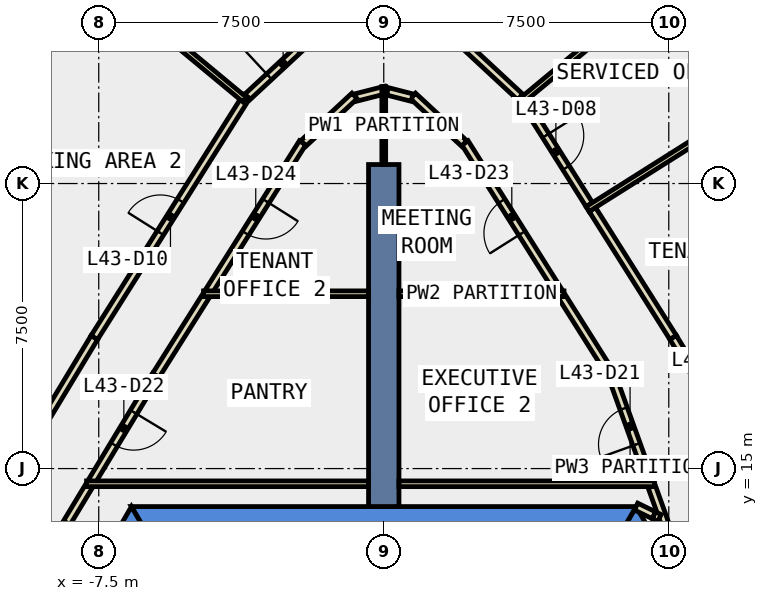
"""IFC4 building model, lengths in metres.
Left out: names, types, materials, properties, quantities, classifications, styles, units other than length and angle.
Written with IfcOpenShell. Run it as: python <this file> out.ifc"""

import sys

from ifc_helpers import new_model, si_unit, direction, frame, frame_2d, origin, place, context, subcontext, project, spatial, polyline, rectangle, outline, extrude, element, fill, save


model = new_model("IFC4")
c1 = context("Model", 3, precision=1e-05, world=origin(), true_north=direction((0.0, 1.0)))
c2 = subcontext(c1, "Body", "Model", "MODEL_VIEW")
j1 = project(units=[si_unit("LENGTHUNIT", "METRE"), si_unit("PLANEANGLEUNIT", "RADIAN")], contexts=[c1])
p1 = place(None, origin())
s1 = spatial("IfcSite", under=j1, at=p1, CompositionType="ELEMENT")
p2 = place(p1, origin())
s2 = spatial("IfcBuilding", under=s1, at=p2, CompositionType="ELEMENT")
p3 = place(p2, frame((0.0, 0.0, 194.0)))
s3 = spatial("IfcBuildingStorey", under=s2, at=p3, CompositionType="ELEMENT", Elevation=194.0)
p4 = place(p3, frame((0.0, 0.0, -0.4)))
e1 = element("IfcWall", 1, at=p4, inside=s3, PredefinedType="SHEAR", context=c2, shape_type="SweptSolid", body=[
    extrude(outline(polyline([(6.478, 12.88), (7.084, 13.23), (6.64, 14.0), (6.235, 13.3), (6.478, 12.88)])), origin(), (0.0, 0.0, 1.0), 4.2),
])
p5 = place(p3, frame((0.0, 0.0, -0.4)))
e2 = element("IfcWall", 2, at=p5, inside=s3, PredefinedType="SHEAR", context=c2, shape_type="SweptSolid", body=[
    extrude(outline(polyline([(6.64, 14.0), (-6.64, 14.0), (-6.235, 13.3), (6.235, 13.3), (6.64, 14.0)])), origin(), (0.0, 0.0, 1.0), 4.2),
])
p6 = place(p3, frame((0.0, 0.0, -0.4)))
e3 = element("IfcWall", 3, at=p6, inside=s3, PredefinedType="SHEAR", context=c2, shape_type="SweptSolid", body=[
    extrude(outline(polyline([(-11.834, 5.002), (-11.228, 4.652), (-6.235, 13.3), (-6.64, 14.0), (-11.834, 5.002)])), origin(), (0.0, 0.0, 1.0), 4.2),
])
p7 = place(p3, frame((0.0, 14.0, -0.4), z_axis=(0.0, 0.0, 1.0), x_axis=(0.0, 1.0, 0.0)))
e4 = element("IfcWall", 4, at=p7, inside=s3, PredefinedType="SHEAR", context=c2, shape_type="SweptSolid", body=[
    extrude(rectangle(XDim=9.0, YDim=0.8, at=frame_2d((4.5, 0.0))), origin(), (0.0, 0.0, 1.0), 4.2),
])
p8 = place(p3, frame((-8.394, 27.988, 0.0), z_axis=(0.0, 0.0, 1.0), x_axis=(-0.533680752529, -0.845686025887, 0.0)))
e5 = element("IfcWall", 5, at=p8, inside=s3, PredefinedType="STANDARD", context=c2, shape_type="SweptSolid", body=[
    extrude(rectangle(XDim=7.208, YDim=0.3, at=frame_2d((3.604, 0.0))), origin(), (0.0, 0.0, 1.0), 3.8),
])
p9 = place(p8, frame((0.602, 0.0, 0.9)))
e6 = element("IfcOpeningElement", 6, at=p9, cuts=e5, PredefinedType="OPENING", context=c2, shape_type="SweptSolid", body=[
    extrude(rectangle(XDim=2.4, YDim=2.6, at=frame_2d((1.2, 1.3))), frame((0.0, 0.16, 0.0), z_axis=(0.0, -1.0, 0.0), x_axis=(1.0, 0.0, 0.0)), (0.0, 0.0, 1.0), 0.32),
])
p10 = place(p8, frame((4.206, 0.0, 0.9)))
e7 = element("IfcOpeningElement", 7, at=p10, cuts=e5, PredefinedType="OPENING", context=c2, shape_type="SweptSolid", body=[
    extrude(rectangle(XDim=2.4, YDim=2.6, at=frame_2d((1.2, 1.3))), frame((0.0, 0.16, 0.0), z_axis=(0.0, -1.0, 0.0), x_axis=(1.0, 0.0, 0.0)), (0.0, 0.0, 1.0), 0.32),
])
p11 = place(p3, frame((6.64, 14.0, 0.0), z_axis=(0.0, 0.0, 1.0), x_axis=(0.899046412443, -0.437853341055, 0.0)))
e8 = element("IfcWall", 8, at=p11, inside=s3, PredefinedType="PARTITIONING", context=c2, shape_type="SweptSolid", body=[
    extrude(rectangle(XDim=0.523, YDim=0.2, at=frame_2d((0.261, 0.0))), origin(), (0.0, 0.0, 1.0), 3.8),
])
p12 = place(p3, frame((7.401, 13.552, 0.0), z_axis=(0.0, 0.0, 1.0), x_axis=(-0.337944878606, 0.941165904091, 0.0)))
e9 = element("IfcWall", 9, at=p12, inside=s3, PredefinedType="PARTITIONING", context=c2, shape_type="SweptSolid", body=[
    extrude(rectangle(XDim=1.038, YDim=0.2, at=frame_2d((0.519, 0.0))), origin(), (0.0, 0.0, 1.0), 3.8),
])
p13 = place(p3, frame((-7.759, 14.536, 0.0), z_axis=(0.0, 0.0, 1.0), x_axis=(-0.516926279395, -0.856029918678, 0.0)))
e10 = element("IfcWall", 10, at=p13, inside=s3, PredefinedType="PARTITIONING", context=c2, shape_type="SweptSolid", body=[
    extrude(rectangle(XDim=3.188, YDim=0.2, at=frame_2d((1.594, 0.0))), origin(), (0.0, 0.0, 1.0), 3.8),
])
p14 = place(p13, frame((1.094, 0.0, 0.0)))
e11 = element("IfcOpeningElement", 11, at=p14, cuts=e10, PredefinedType="OPENING", context=c2, shape_type="SweptSolid", body=[
    extrude(rectangle(XDim=1.0, YDim=2.1, at=frame_2d((0.5, 1.05))), frame((0.0, 0.11, 0.0), z_axis=(0.0, -1.0, 0.0), x_axis=(1.0, 0.0, 0.0)), (0.0, 0.0, 1.0), 0.22),
])
p15 = place(p3, frame((6.999, 14.671, 0.0), z_axis=(0.0, 0.0, 1.0), x_axis=(-0.338795881304, 0.940859899672, 0.0)))
e12 = element("IfcWall", 12, at=p15, inside=s3, PredefinedType="PARTITIONING", context=c2, shape_type="SweptSolid", body=[
    extrude(rectangle(XDim=3.055, YDim=0.2, at=frame_2d((1.527, 0.0))), origin(), (0.0, 0.0, 1.0), 3.8),
])
p16 = place(p15, frame((1.027, 0.0, 0.0)))
e13 = element("IfcOpeningElement", 13, at=p16, cuts=e12, PredefinedType="OPENING", context=c2, shape_type="SweptSolid", body=[
    extrude(rectangle(XDim=1.0, YDim=2.1, at=frame_2d((0.5, 1.05))), frame((0.0, 0.11, 0.0), z_axis=(0.0, -1.0, 0.0), x_axis=(1.0, 0.0, 0.0)), (0.0, 0.0, 1.0), 0.22),
])
p17 = place(p3, frame((5.945, 17.535, 0.0), z_axis=(0.0, 0.0, 1.0), x_axis=(-0.533581643518, 0.845748561749, 0.0)))
e14 = element("IfcWall", 14, at=p17, inside=s3, PredefinedType="PARTITIONING", context=c2, shape_type="SweptSolid", body=[
    extrude(rectangle(XDim=2.367, YDim=0.2, at=frame_2d((1.184, 0.0))), origin(), (0.0, 0.0, 1.0), 3.8),
])
p18 = place(p3, frame((-4.682, 19.537, 0.0), z_axis=(0.0, 0.0, 1.0), x_axis=(-0.533579580306, -0.845749863423, 0.0)))
e15 = element("IfcWall", 15, at=p18, inside=s3, PredefinedType="PARTITIONING", context=c2, shape_type="SweptSolid", body=[
    extrude(rectangle(XDim=2.467, YDim=0.2, at=frame_2d((1.233, 0.0))), origin(), (0.0, 0.0, 1.0), 3.8),
])
p19 = place(p3, frame((-5.998, 17.451, 0.0), z_axis=(0.0, 0.0, 1.0), x_axis=(-0.516919907997, -0.856033766108, 0.0)))
e16 = element("IfcWall", 16, at=p19, inside=s3, PredefinedType="PARTITIONING", context=c2, shape_type="SweptSolid", body=[
    extrude(rectangle(XDim=3.256, YDim=0.2, at=frame_2d((1.628, 0.0))), origin(), (0.0, 0.0, 1.0), 3.8),
])
p20 = place(p19, frame((1.128, 0.0, 0.0)))
e17 = element("IfcOpeningElement", 17, at=p20, cuts=e16, PredefinedType="OPENING", context=c2, shape_type="SweptSolid", body=[
    extrude(rectangle(XDim=1.0, YDim=2.1, at=frame_2d((0.5, 1.05))), frame((0.0, 0.11, 0.0), z_axis=(0.0, -1.0, 0.0), x_axis=(1.0, 0.0, 0.0)), (0.0, 0.0, 1.0), 0.22),
])
p21 = place(p3, frame((4.602, 19.663, 0.0), z_axis=(0.0, 0.0, 1.0), x_axis=(-0.533664968846, 0.845695986171, 0.0)))
e18 = element("IfcWall", 18, at=p21, inside=s3, PredefinedType="PARTITIONING", context=c2, shape_type="SweptSolid", body=[
    extrude(rectangle(XDim=4.621, YDim=0.2, at=frame_2d((2.311, 0.0))), origin(), (0.0, 0.0, 1.0), 3.8),
])
p22 = place(p21, frame((1.81, 0.0, 0.0)))
e19 = element("IfcOpeningElement", 19, at=p22, cuts=e18, PredefinedType="OPENING", context=c2, shape_type="SweptSolid", body=[
    extrude(rectangle(XDim=1.0, YDim=2.1, at=frame_2d((0.5, 1.05))), frame((0.0, 0.11, 0.0), z_axis=(0.0, -1.0, 0.0), x_axis=(1.0, 0.0, 0.0)), (0.0, 0.0, 1.0), 0.22),
])
p23 = place(p3, frame((2.116, 23.554, 0.0), z_axis=(0.0, 0.0, 1.0), x_axis=(-0.732722533409, 0.680527507919, 0.0)))
e20 = element("IfcWall", 20, at=p23, inside=s3, PredefinedType="PARTITIONING", context=c2, shape_type="SweptSolid", body=[
    extrude(rectangle(XDim=1.838, YDim=0.2, at=frame_2d((0.919, 0.0))), origin(), (0.0, 0.0, 1.0), 3.8),
])
p24 = place(p3, frame((0.745, 24.761, 0.0), z_axis=(0.0, 0.0, 1.0), x_axis=(-0.969081307177, 0.246741605895, 0.0)))
e21 = element("IfcWall", 21, at=p24, inside=s3, PredefinedType="PARTITIONING", context=c2, shape_type="SweptSolid", body=[
    extrude(rectangle(XDim=0.669, YDim=0.2, at=frame_2d((0.334, 0.0))), origin(), (0.0, 0.0, 1.0), 3.8),
])
p25 = place(p3, frame((0.048, 24.963, 0.0), z_axis=(0.0, 0.0, 1.0), x_axis=(-0.969098470359, -0.246674187438, 0.0)))
e22 = element("IfcWall", 22, at=p25, inside=s3, PredefinedType="PARTITIONING", context=c2, shape_type="SweptSolid", body=[
    extrude(rectangle(XDim=0.819, YDim=0.2, at=frame_2d((0.409, 0.0))), origin(), (0.0, 0.0, 1.0), 3.8),
])
p26 = place(p3, frame((-0.769, 24.805, 0.0), z_axis=(0.0, 0.0, 1.0), x_axis=(-0.732722533409, -0.680527507919, 0.0)))
e23 = element("IfcWall", 23, at=p26, inside=s3, PredefinedType="PARTITIONING", context=c2, shape_type="SweptSolid", body=[
    extrude(rectangle(XDim=1.838, YDim=0.2, at=frame_2d((0.919, 0.0))), origin(), (0.0, 0.0, 1.0), 3.8),
])
p27 = place(p3, frame((-2.136, 23.571, 0.0), z_axis=(0.0, 0.0, 1.0), x_axis=(-0.533664968846, -0.845695986171, 0.0)))
e24 = element("IfcWall", 24, at=p27, inside=s3, PredefinedType="PARTITIONING", context=c2, shape_type="SweptSolid", body=[
    extrude(rectangle(XDim=4.621, YDim=0.2, at=frame_2d((2.311, 0.0))), origin(), (0.0, 0.0, 1.0), 3.8),
])
p28 = place(p27, frame((1.81, 0.0, 0.0)))
e25 = element("IfcOpeningElement", 25, at=p28, cuts=e24, PredefinedType="OPENING", context=c2, shape_type="SweptSolid", body=[
    extrude(rectangle(XDim=1.0, YDim=2.1, at=frame_2d((0.5, 1.05))), frame((0.0, 0.11, 0.0), z_axis=(0.0, -1.0, 0.0), x_axis=(1.0, 0.0, 0.0)), (0.0, 0.0, 1.0), 0.22),
])
p29 = place(p3, frame((5.489, 21.817, 0.0), z_axis=(0.0, 0.0, 1.0), x_axis=(0.533790022325, -0.845617059943, 0.0)))
e26 = element("IfcWall", 26, at=p29, inside=s3, PredefinedType="PARTITIONING", context=c2, shape_type="SweptSolid", body=[
    extrude(rectangle(XDim=3.983, YDim=0.2, at=frame_2d((1.991, 0.0))), origin(), (0.0, 0.0, 1.0), 3.8),
])
p30 = place(p3, frame((7.615, 18.449, 0.0), z_axis=(0.0, 0.0, 1.0), x_axis=(0.516918251554, -0.856034766356, 0.0)))
e27 = element("IfcWall", 27, at=p30, inside=s3, PredefinedType="PARTITIONING", context=c2, shape_type="SweptSolid", body=[
    extrude(rectangle(XDim=3.983, YDim=0.2, at=frame_2d((1.992, 0.0))), origin(), (0.0, 0.0, 1.0), 3.8),
])
p31 = place(p30, frame((1.492, 0.0, 0.0)))
e28 = element("IfcOpeningElement", 28, at=p31, cuts=e27, PredefinedType="OPENING", context=c2, shape_type="SweptSolid", body=[
    extrude(rectangle(XDim=1.0, YDim=2.1, at=frame_2d((0.5, 1.05))), frame((0.0, 0.11, 0.0), z_axis=(0.0, -1.0, 0.0), x_axis=(1.0, 0.0, 0.0)), (0.0, 0.0, 1.0), 0.22),
])
p32 = place(p3, frame((3.65, 24.731, 0.0), z_axis=(0.0, 0.0, 1.0), x_axis=(0.533756056831, -0.845638499476, 0.0)))
e29 = element("IfcWall", 29, at=p32, inside=s3, PredefinedType="PARTITIONING", context=c2, shape_type="SweptSolid", body=[
    extrude(rectangle(XDim=3.296, YDim=0.2, at=frame_2d((1.648, 0.0))), origin(), (0.0, 0.0, 1.0), 3.8),
])
p33 = place(p32, frame((1.148, 0.0, 0.0)))
e30 = element("IfcOpeningElement", 30, at=p33, cuts=e29, PredefinedType="OPENING", context=c2, shape_type="SweptSolid", body=[
    extrude(rectangle(XDim=1.0, YDim=2.1, at=frame_2d((0.5, 1.05))), frame((0.0, 0.11, 0.0), z_axis=(0.0, -1.0, 0.0), x_axis=(1.0, 0.0, 0.0)), (0.0, 0.0, 1.0), 0.22),
])
p34 = place(p3, frame((-3.59, 24.778, 0.0), z_axis=(0.0, 0.0, 1.0), x_axis=(0.732939008525, 0.680294355248, 0.0)))
e31 = element("IfcWall", 31, at=p34, inside=s3, PredefinedType="PARTITIONING", context=c2, shape_type="SweptSolid", body=[
    extrude(rectangle(XDim=2.569, YDim=0.2, at=frame_2d((1.285, 0.0))), origin(), (0.0, 0.0, 1.0), 3.8),
])
p35 = place(p34, frame((0.785, 0.0, 0.0)))
e32 = element("IfcOpeningElement", 32, at=p35, cuts=e31, PredefinedType="OPENING", context=c2, shape_type="SweptSolid", body=[
    extrude(rectangle(XDim=1.0, YDim=2.1, at=frame_2d((0.5, 1.05))), frame((0.0, 0.11, 0.0), z_axis=(0.0, -1.0, 0.0), x_axis=(1.0, 0.0, 0.0)), (0.0, 0.0, 1.0), 0.22),
])
p36 = place(p3, frame((1.707, 26.526, 0.0), z_axis=(0.0, 0.0, 1.0), x_axis=(0.732939008525, -0.680294355248, 0.0)))
e33 = element("IfcWall", 33, at=p36, inside=s3, PredefinedType="PARTITIONING", context=c2, shape_type="SweptSolid", body=[
    extrude(rectangle(XDim=2.569, YDim=0.2, at=frame_2d((1.285, 0.0))), origin(), (0.0, 0.0, 1.0), 3.8),
])
p37 = place(p3, frame((-9.674, 15.039, 0.0), z_axis=(0.0, 0.0, 1.0), x_axis=(0.516918251554, 0.856034766356, 0.0)))
e34 = element("IfcWall", 34, at=p37, inside=s3, PredefinedType="PARTITIONING", context=c2, shape_type="SweptSolid", body=[
    extrude(rectangle(XDim=3.983, YDim=0.2, at=frame_2d((1.992, 0.0))), origin(), (0.0, 0.0, 1.0), 3.8),
])
p38 = place(p3, frame((-7.615, 18.449, 0.0), z_axis=(0.0, 0.0, 1.0), x_axis=(0.533699180497, 0.845674396406, 0.0)))
e35 = element("IfcWall", 35, at=p38, inside=s3, PredefinedType="PARTITIONING", context=c2, shape_type="SweptSolid", body=[
    extrude(rectangle(XDim=7.504, YDim=0.2, at=frame_2d((3.752, 0.0))), origin(), (0.0, 0.0, 1.0), 3.8),
])
p39 = place(p38, frame((3.252, 0.0, 0.0)))
e36 = element("IfcOpeningElement", 36, at=p39, cuts=e35, PredefinedType="OPENING", context=c2, shape_type="SweptSolid", body=[
    extrude(rectangle(XDim=1.0, YDim=2.1, at=frame_2d((0.5, 1.05))), frame((0.0, 0.11, 0.0), z_axis=(0.0, -1.0, 0.0), x_axis=(1.0, 0.0, 0.0)), (0.0, 0.0, 1.0), 0.22),
])
p40 = place(p3, frame((7.124, 14.6, 0.0), z_axis=(0.0, 0.0, 1.0), x_axis=(-1.0, 0.0, 0.0)))
e37 = element("IfcWall", 37, at=p40, inside=s3, PredefinedType="PARTITIONING", context=c2, shape_type="SweptSolid", body=[
    extrude(rectangle(XDim=6.724, YDim=0.15, at=frame_2d((3.362, 0.0))), origin(), (0.0, 0.0, 1.0), 3.8),
])
p41 = place(p3, frame((-0.4, 14.6, 0.0), z_axis=(0.0, 0.0, 1.0), x_axis=(-1.0, 0.0, 0.0)))
e38 = element("IfcWall", 38, at=p41, inside=s3, PredefinedType="PARTITIONING", context=c2, shape_type="SweptSolid", body=[
    extrude(rectangle(XDim=7.42, YDim=0.15, at=frame_2d((3.71, 0.0))), origin(), (0.0, 0.0, 1.0), 3.8),
])
for number, where, z_axis, x_axis in (
    (39, (0.4, 19.6, 0.0), (0.0, 0.0, 1.0), (1.0, 0.0, 0.0)),
    (40, (-4.742, 19.6, 0.0), (0.0, 0.0, 1.0), (1.0, 0.0, 0.0)),
):
    element("IfcWall", number, at=place(p3, frame(where, z_axis=z_axis, x_axis=x_axis)), inside=s3, PredefinedType="PARTITIONING", context=c2, shape_type="SweptSolid", body=[
        extrude(rectangle(XDim=4.342, YDim=0.15, at=frame_2d((2.171, 0.0))), origin(), (0.0, 0.0, 1.0), 3.8),
    ])
p42 = place(p3, frame((0.0, 23.0, 0.0), z_axis=(0.0, 0.0, 1.0), x_axis=(0.0, 1.0, 0.0)))
e41 = element("IfcWall", 41, at=p42, inside=s3, PredefinedType="PARTITIONING", context=c2, shape_type="SweptSolid", body=[
    extrude(rectangle(XDim=2.051, YDim=0.1, at=frame_2d((1.025, 0.0))), origin(), (0.0, 0.0, 1.0), 3.8),
])
p43 = place(p3, frame((5.364, 21.827, 0.0), z_axis=(0.0, 0.0, 1.0), x_axis=(0.845716787596, 0.533632003517, 0.0)))
e42 = element("IfcWall", 42, at=p43, inside=s3, PredefinedType="PARTITIONING", context=c2, shape_type="SweptSolid", body=[
    extrude(rectangle(XDim=5.7, YDim=0.15, at=frame_2d((2.85, 0.0))), origin(), (0.0, 0.0, 1.0), 3.8),
])
p44 = place(p3, frame((3.586, 24.646, 0.0), z_axis=(0.0, 0.0, 1.0), x_axis=(0.769538645463, 0.638600245176, 0.0)))
e43 = element("IfcWall", 43, at=p44, inside=s3, PredefinedType="PARTITIONING", context=c2, shape_type="SweptSolid", body=[
    extrude(rectangle(XDim=4.43, YDim=0.15, at=frame_2d((2.215, 0.0))), origin(), (0.0, 0.0, 1.0), 3.8),
])
p45 = place(p3, frame((-3.663, 24.71, 0.0), z_axis=(0.0, 0.0, 1.0), x_axis=(-0.76953221629, 0.638607992505, 0.0)))
e44 = element("IfcWall", 44, at=p45, inside=s3, PredefinedType="PARTITIONING", context=c2, shape_type="SweptSolid", body=[
    extrude(rectangle(XDim=4.33, YDim=0.15, at=frame_2d((2.165, 0.0))), origin(), (0.0, 0.0, 1.0), 3.8),
])
p46 = place(p3, frame((7.11, 13.771, 0.0), z_axis=(0.0, 0.0, 1.0), x_axis=(0.900120852209, -0.435640277545, 0.0)))
e45 = element("IfcWall", 45, at=p46, inside=s3, PredefinedType="PARTITIONING", context=c2, shape_type="SweptSolid", body=[
    extrude(rectangle(XDim=0.161, YDim=0.2, at=frame_2d((0.081, 0.0))), origin(), (0.0, 0.0, 1.0), 2.4),
])
p47 = place(p9, origin())
e46 = element("IfcWindow", 46, at=p47, inside=s3, PartitioningType="SINGLE_PANEL", PredefinedType="WINDOW", context=c2, shape_type="SweptSolid", body=[
    extrude(rectangle(XDim=2.4, YDim=2.6, at=frame_2d((1.2, 1.3))), frame((0.0, 0.03, 0.0), z_axis=(0.0, -1.0, 0.0), x_axis=(1.0, 0.0, 0.0)), (0.0, 0.0, 1.0), 0.06),
])
fill(e6, e46)
p48 = place(p33, origin())
e47 = element("IfcDoor", 47, at=p48, inside=s3, OperationType="SINGLE_SWING_LEFT", PredefinedType="DOOR", context=c2, shape_type="SweptSolid", body=[
    extrude(rectangle(XDim=1.0, YDim=2.1, at=frame_2d((0.5, 1.05))), frame((0.0, 0.025, 0.0), z_axis=(0.0, -1.0, 0.0), x_axis=(1.0, 0.0, 0.0)), (0.0, 0.0, 1.0), 0.05),
])
fill(e30, e47)
p49 = place(p35, origin())
e48 = element("IfcDoor", 48, at=p49, inside=s3, OperationType="SINGLE_SWING_LEFT", PredefinedType="DOOR", context=c2, shape_type="SweptSolid", body=[
    extrude(rectangle(XDim=1.0, YDim=2.1, at=frame_2d((0.5, 1.05))), frame((0.0, 0.025, 0.0), z_axis=(0.0, -1.0, 0.0), x_axis=(1.0, 0.0, 0.0)), (0.0, 0.0, 1.0), 0.05),
])
fill(e32, e48)
p50 = place(p39, origin())
e49 = element("IfcDoor", 49, at=p50, inside=s3, OperationType="SINGLE_SWING_RIGHT", PredefinedType="DOOR", context=c2, shape_type="SweptSolid", body=[
    extrude(rectangle(XDim=1.0, YDim=2.1, at=frame_2d((0.5, 1.05))), frame((0.0, 0.025, 0.0), z_axis=(0.0, -1.0, 0.0), x_axis=(1.0, 0.0, 0.0)), (0.0, 0.0, 1.0), 0.05),
])
fill(e36, e49)
p51 = place(p16, origin())
e50 = element("IfcDoor", 50, at=p51, inside=s3, OperationType="SINGLE_SWING_LEFT", PredefinedType="DOOR", context=c2, shape_type="SweptSolid", body=[
    extrude(rectangle(XDim=1.0, YDim=2.1, at=frame_2d((0.5, 1.05))), frame((0.0, 0.025, 0.0), z_axis=(0.0, -1.0, 0.0), x_axis=(1.0, 0.0, 0.0)), (0.0, 0.0, 1.0), 0.05),
])
fill(e13, e50)
p52 = place(p20, origin())
e51 = element("IfcDoor", 51, at=p52, inside=s3, OperationType="SINGLE_SWING_RIGHT", PredefinedType="DOOR", context=c2, shape_type="SweptSolid", body=[
    extrude(rectangle(XDim=1.0, YDim=2.1, at=frame_2d((0.5, 1.05))), frame((0.0, 0.025, 0.0), z_axis=(0.0, -1.0, 0.0), x_axis=(1.0, 0.0, 0.0)), (0.0, 0.0, 1.0), 0.05),
])
fill(e17, e51)
p53 = place(p22, origin())
e52 = element("IfcDoor", 52, at=p53, inside=s3, OperationType="SINGLE_SWING_LEFT", PredefinedType="DOOR", context=c2, shape_type="SweptSolid", body=[
    extrude(rectangle(XDim=1.0, YDim=2.1, at=frame_2d((0.5, 1.05))), frame((0.0, 0.025, 0.0), z_axis=(0.0, -1.0, 0.0), x_axis=(1.0, 0.0, 0.0)), (0.0, 0.0, 1.0), 0.05),
])
fill(e19, e52)
p54 = place(p28, origin())
e53 = element("IfcDoor", 53, at=p54, inside=s3, OperationType="SINGLE_SWING_LEFT", PredefinedType="DOOR", context=c2, shape_type="SweptSolid", body=[
    extrude(rectangle(XDim=1.0, YDim=2.1, at=frame_2d((0.5, 1.05))), frame((0.0, 0.025, 0.0), z_axis=(0.0, -1.0, 0.0), x_axis=(1.0, 0.0, 0.0)), (0.0, 0.0, 1.0), 0.05),
])
fill(e25, e53)
p55 = place(p14, origin())
e54 = element("IfcDoor", 54, at=p55, inside=s3, OperationType="SINGLE_SWING_LEFT", PredefinedType="DOOR", context=c2, shape_type="SweptSolid", body=[
    extrude(rectangle(XDim=1.0, YDim=2.1, at=frame_2d((0.5, 1.05))), frame((0.0, 0.025, 0.0), z_axis=(0.0, -1.0, 0.0), x_axis=(1.0, 0.0, 0.0)), (0.0, 0.0, 1.0), 0.05),
])
fill(e11, e54)
save(model, sys.argv[1])
